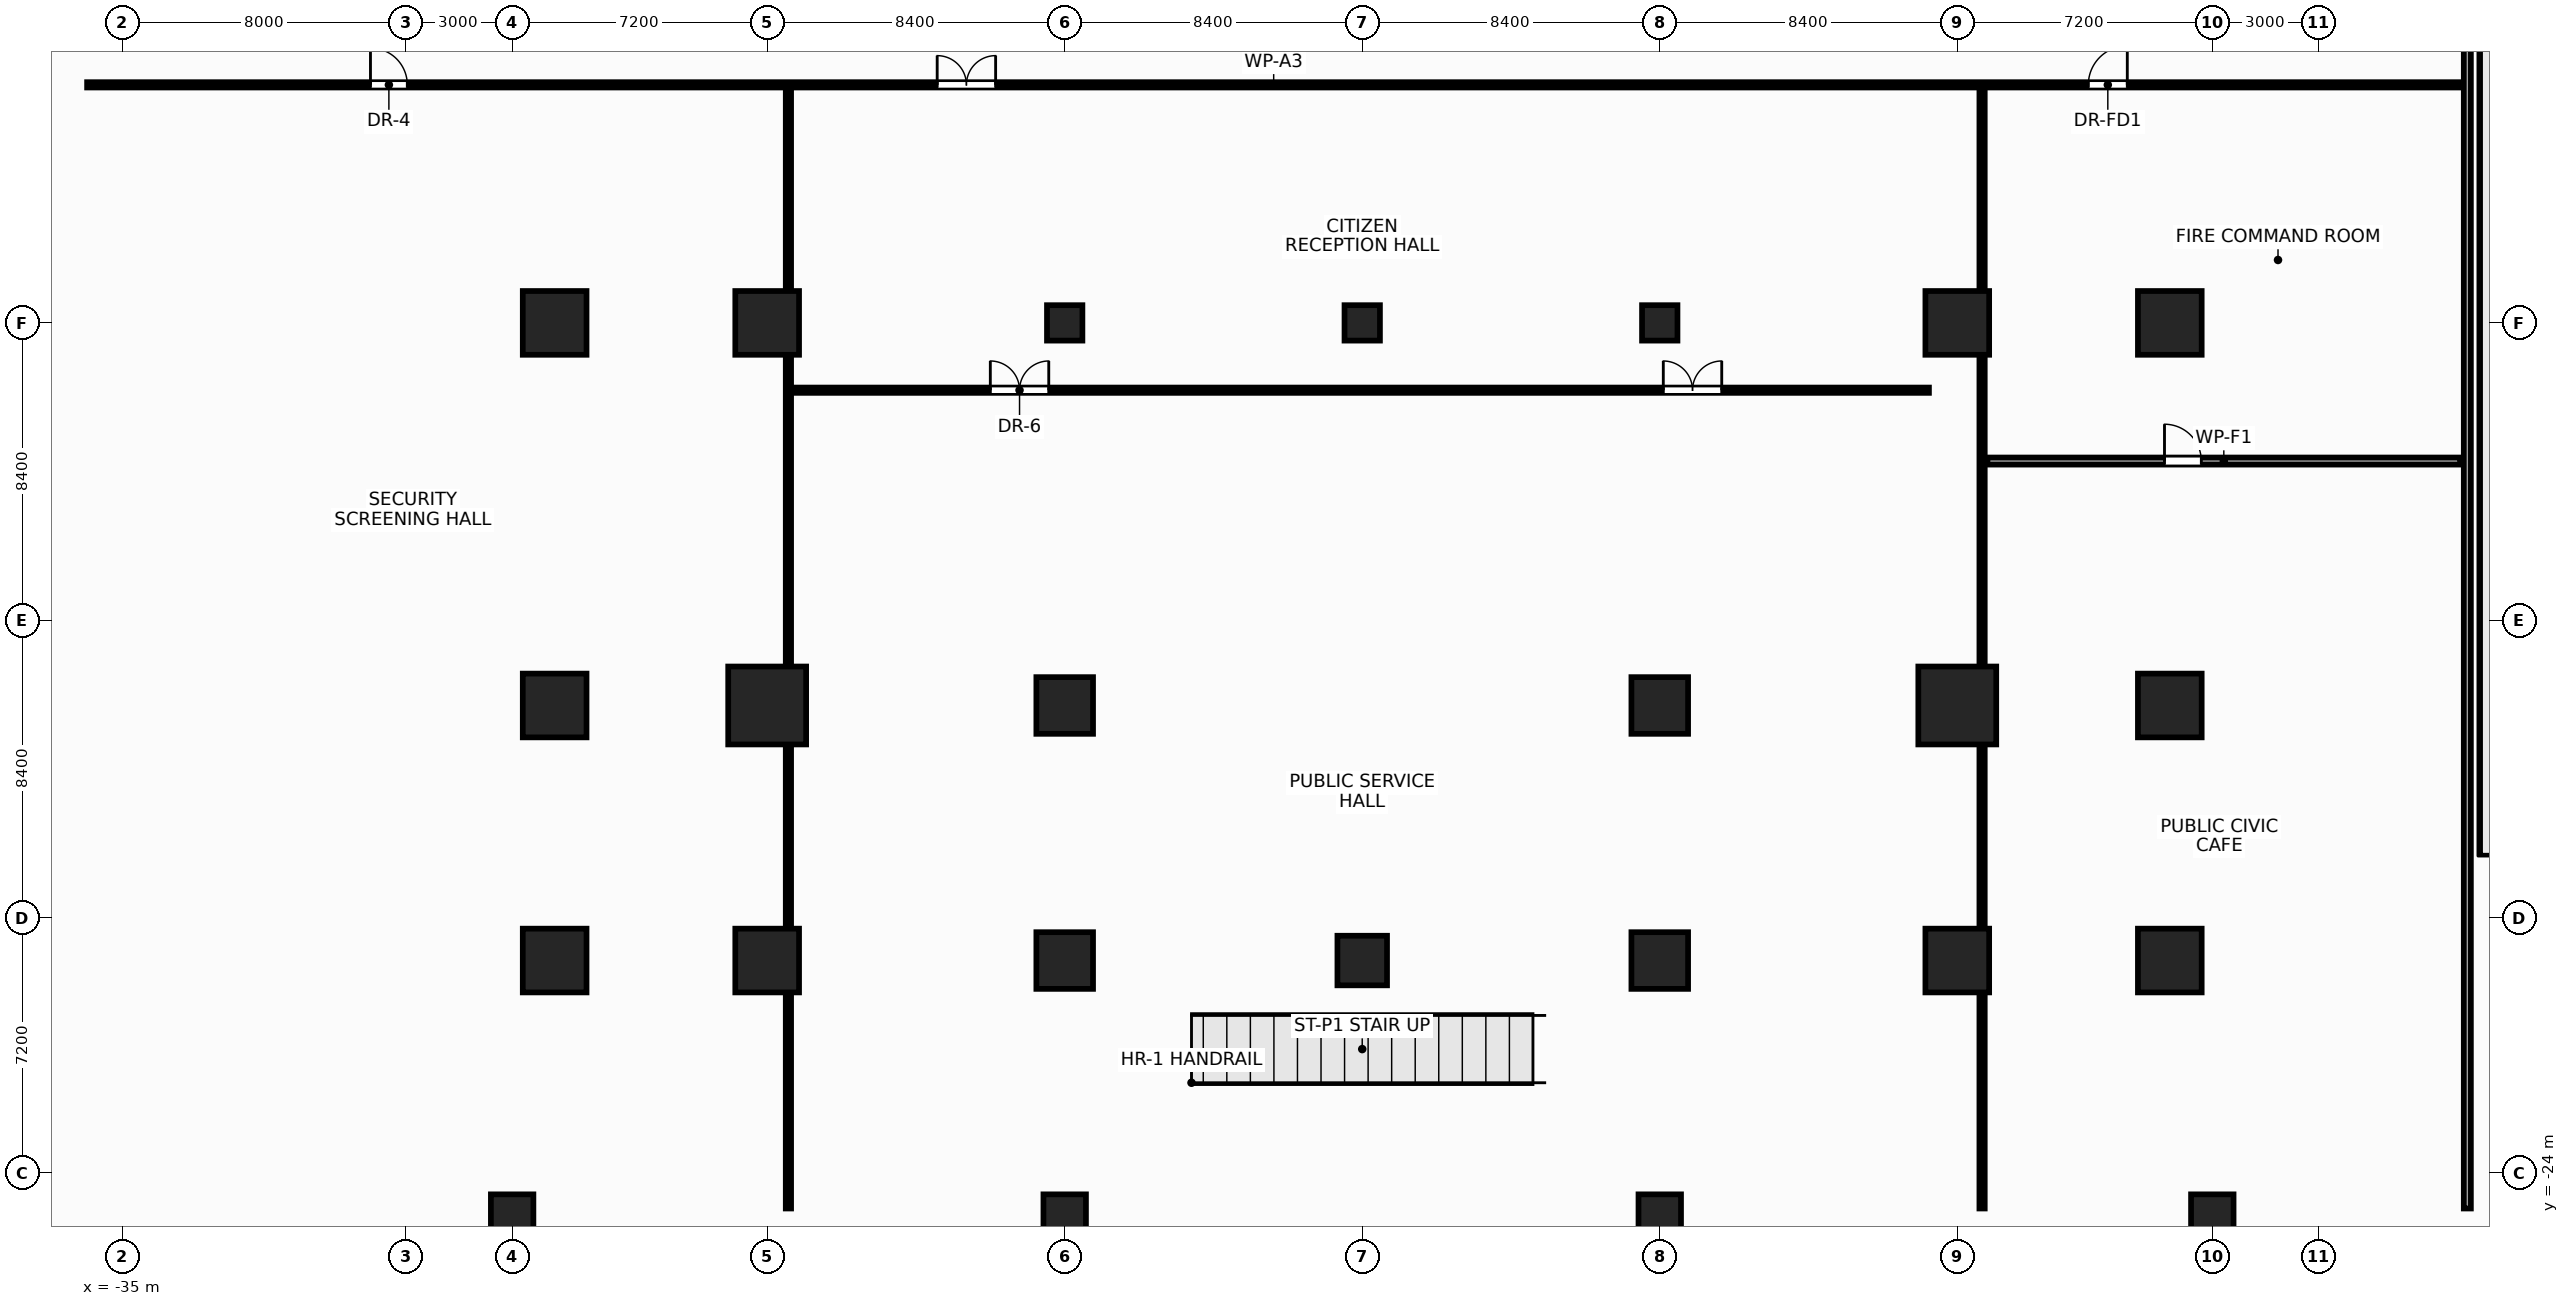
"""IFC4 building model, lengths in metres.
Left out: names, types, materials, properties, quantities, classifications, styles, units other than length and angle.
Written with IfcOpenShell. Run it as: python <this file> out.ifc"""

import sys

from ifc_helpers import new_model, si_unit, direction, frame, frame_2d, origin, origin_with_axes, origin_2d, place, context, subcontext, project, spatial, rectangle, hollow_rectangle, extrude, source, transform, mapped, element, fill, save


model = new_model("IFC4")
c1 = context("Model", 3, precision=1e-05, world=origin(), true_north=direction((0.0, 1.0)))
c2 = subcontext(c1, "Body", "Model", "MODEL_VIEW")
j1 = project(units=[si_unit("LENGTHUNIT", "METRE"), si_unit("PLANEANGLEUNIT", "RADIAN")], contexts=[c1])
p1 = place(None, origin())
s1 = spatial("IfcSite", under=j1, at=p1, CompositionType="ELEMENT")
p2 = place(p1, origin())
s2 = spatial("IfcBuilding", under=s1, at=p2, CompositionType="ELEMENT")
p3 = place(p2, origin())
s3 = spatial("IfcBuildingStorey", under=s2, at=p3, CompositionType="ELEMENT", Elevation=0.0)
m1 = source(origin(), c2, "Body", "SweptSolid", [
    extrude(hollow_rectangle(XDim=1.2, YDim=1.2, WallThickness=0.055, at=origin_2d()), origin(), (0.0, 0.0, 1.0), 5.0),
])
for number, where, z_axis, x_axis in (
    (1, (-24.0, -25.2, 0.0), (0.0, 0.0, 1.0), (1.0, 0.0, 0.0)),
    (2, (-8.4, -25.2, 0.0), (0.0, 0.0, 1.0), (1.0, 0.0, 0.0)),
    (3, (8.4, -25.2, 0.0), (0.0, 0.0, 1.0), (1.0, 0.0, 0.0)),
    (4, (24.0, -25.2, 0.0), (0.0, 0.0, 1.0), (1.0, 0.0, 0.0)),
):
    element("IfcColumn", number, at=place(p3, frame(where, z_axis=z_axis, x_axis=x_axis)), inside=s3, PredefinedType="COLUMN", context=c2, shape_type="MappedRepresentation", body=[
        mapped(m1, transform((0.0, 0.0, 0.0), x_axis=(1.0, 0.0, 0.0), y_axis=(0.0, 1.0, 0.0), z_axis=(0.0, 0.0, 1.0), scale=1.0)),
    ])
m2 = source(origin(), c2, "Body", "SweptSolid", [
    extrude(rectangle(XDim=1.8, YDim=1.8, at=origin_2d()), origin(), (0.0, 0.0, 1.0), 5.0),
])
p4 = place(p3, frame((-16.8, -18.0, 0.0), z_axis=(0.0, 0.0, 1.0), x_axis=(1.0, 0.0, 0.0)))
e5 = element("IfcColumn", 5, at=p4, inside=s3, PredefinedType="COLUMN", context=c2, shape_type="MappedRepresentation", body=[
    mapped(m2, transform((0.0, 0.0, 0.0), x_axis=(1.0, 0.0, 0.0), y_axis=(0.0, 1.0, 0.0), z_axis=(0.0, 0.0, 1.0), scale=1.0)),
])
m3 = source(origin(), c2, "Body", "SweptSolid", [
    extrude(rectangle(XDim=2.2, YDim=2.2, at=origin_2d()), origin(), (0.0, 0.0, 1.0), 5.0),
])
p5 = place(p3, frame((-16.8, -10.8, 0.0), z_axis=(0.0, 0.0, 1.0), x_axis=(1.0, 0.0, 0.0)))
e6 = element("IfcColumn", 6, at=p5, inside=s3, PredefinedType="COLUMN", context=c2, shape_type="MappedRepresentation", body=[
    mapped(m3, transform((0.0, 0.0, 0.0), x_axis=(1.0, 0.0, 0.0), y_axis=(0.0, 1.0, 0.0), z_axis=(0.0, 0.0, 1.0), scale=1.0)),
])
for number, where, z_axis, x_axis in (
    (7, (-16.8, 0.0, 0.0), (0.0, 0.0, 1.0), (1.0, 0.0, 0.0)),
    (8, (16.8, -18.0, 0.0), (0.0, 0.0, 1.0), (1.0, 0.0, 0.0)),
):
    element("IfcColumn", number, at=place(p3, frame(where, z_axis=z_axis, x_axis=x_axis)), inside=s3, PredefinedType="COLUMN", context=c2, shape_type="MappedRepresentation", body=[
        mapped(m2, transform((0.0, 0.0, 0.0), x_axis=(1.0, 0.0, 0.0), y_axis=(0.0, 1.0, 0.0), z_axis=(0.0, 0.0, 1.0), scale=1.0)),
    ])
p6 = place(p3, frame((16.8, -10.8, 0.0), z_axis=(0.0, 0.0, 1.0), x_axis=(1.0, 0.0, 0.0)))
e9 = element("IfcColumn", 9, at=p6, inside=s3, PredefinedType="COLUMN", context=c2, shape_type="MappedRepresentation", body=[
    mapped(m3, transform((0.0, 0.0, 0.0), x_axis=(1.0, 0.0, 0.0), y_axis=(0.0, 1.0, 0.0), z_axis=(0.0, 0.0, 1.0), scale=1.0)),
])
for number, where, z_axis, x_axis in (
    (10, (16.8, 0.0, 0.0), (0.0, 0.0, 1.0), (1.0, 0.0, 0.0)),
    (11, (-22.8, -18.0, 0.0), (0.0, 0.0, 1.0), (1.0, 0.0, 0.0)),
    (12, (-22.8, -10.8, 0.0), (0.0, 0.0, 1.0), (1.0, 0.0, 0.0)),
    (13, (-22.8, 0.0, 0.0), (0.0, 0.0, 1.0), (1.0, 0.0, 0.0)),
    (14, (22.8, -18.0, 0.0), (0.0, 0.0, 1.0), (1.0, 0.0, 0.0)),
    (15, (22.8, -10.8, 0.0), (0.0, 0.0, 1.0), (1.0, 0.0, 0.0)),
    (16, (22.8, 0.0, 0.0), (0.0, 0.0, 1.0), (1.0, 0.0, 0.0)),
):
    element("IfcColumn", number, at=place(p3, frame(where, z_axis=z_axis, x_axis=x_axis)), inside=s3, PredefinedType="COLUMN", context=c2, shape_type="MappedRepresentation", body=[
        mapped(m2, transform((0.0, 0.0, 0.0), x_axis=(1.0, 0.0, 0.0), y_axis=(0.0, 1.0, 0.0), z_axis=(0.0, 0.0, 1.0), scale=1.0)),
    ])
m4 = source(origin(), c2, "Body", "SweptSolid", [
    extrude(rectangle(XDim=1.6, YDim=1.6, at=origin_2d()), origin(), (0.0, 0.0, 1.0), 5.0),
])
p7 = place(p3, frame((-8.4, -18.0, 0.0), z_axis=(0.0, 0.0, 1.0), x_axis=(1.0, 0.0, 0.0)))
e17 = element("IfcColumn", 17, at=p7, inside=s3, PredefinedType="COLUMN", context=c2, shape_type="MappedRepresentation", body=[
    mapped(m4, transform((0.0, 0.0, 0.0), x_axis=(1.0, 0.0, 0.0), y_axis=(0.0, 1.0, 0.0), z_axis=(0.0, 0.0, 1.0), scale=1.0)),
])
m5 = source(origin(), c2, "Body", "SweptSolid", [
    extrude(hollow_rectangle(XDim=1.0, YDim=1.0, WallThickness=0.045, at=origin_2d()), origin(), (0.0, 0.0, 1.0), 5.0),
])
p8 = place(p3, frame((-8.4, 0.0, 0.0), z_axis=(0.0, 0.0, 1.0), x_axis=(1.0, 0.0, 0.0)))
e18 = element("IfcColumn", 18, at=p8, inside=s3, PredefinedType="COLUMN", context=c2, shape_type="MappedRepresentation", body=[
    mapped(m5, transform((0.0, 0.0, 0.0), x_axis=(1.0, 0.0, 0.0), y_axis=(0.0, 1.0, 0.0), z_axis=(0.0, 0.0, 1.0), scale=1.0)),
])
for number, where, z_axis, x_axis in (
    (19, (-8.4, -10.8, 0.0), (0.0, 0.0, 1.0), (1.0, 0.0, 0.0)),
    (20, (8.4, -18.0, 0.0), (0.0, 0.0, 1.0), (1.0, 0.0, 0.0)),
):
    element("IfcColumn", number, at=place(p3, frame(where, z_axis=z_axis, x_axis=x_axis)), inside=s3, PredefinedType="COLUMN", context=c2, shape_type="MappedRepresentation", body=[
        mapped(m4, transform((0.0, 0.0, 0.0), x_axis=(1.0, 0.0, 0.0), y_axis=(0.0, 1.0, 0.0), z_axis=(0.0, 0.0, 1.0), scale=1.0)),
    ])
p9 = place(p3, frame((8.4, 0.0, 0.0), z_axis=(0.0, 0.0, 1.0), x_axis=(1.0, 0.0, 0.0)))
e21 = element("IfcColumn", 21, at=p9, inside=s3, PredefinedType="COLUMN", context=c2, shape_type="MappedRepresentation", body=[
    mapped(m5, transform((0.0, 0.0, 0.0), x_axis=(1.0, 0.0, 0.0), y_axis=(0.0, 1.0, 0.0), z_axis=(0.0, 0.0, 1.0), scale=1.0)),
])
p10 = place(p3, frame((8.4, -10.8, 0.0), z_axis=(0.0, 0.0, 1.0), x_axis=(1.0, 0.0, 0.0)))
e22 = element("IfcColumn", 22, at=p10, inside=s3, PredefinedType="COLUMN", context=c2, shape_type="MappedRepresentation", body=[
    mapped(m4, transform((0.0, 0.0, 0.0), x_axis=(1.0, 0.0, 0.0), y_axis=(0.0, 1.0, 0.0), z_axis=(0.0, 0.0, 1.0), scale=1.0)),
])
m6 = source(origin(), c2, "Body", "SweptSolid", [
    extrude(rectangle(XDim=1.4, YDim=1.4, at=origin_2d()), origin(), (0.0, 0.0, 1.0), 5.0),
])
p11 = place(p3, frame((0.0, -18.0, 0.0), z_axis=(0.0, 0.0, 1.0), x_axis=(1.0, 0.0, 0.0)))
e23 = element("IfcColumn", 23, at=p11, inside=s3, PredefinedType="COLUMN", context=c2, shape_type="MappedRepresentation", body=[
    mapped(m6, transform((0.0, 0.0, 0.0), x_axis=(1.0, 0.0, 0.0), y_axis=(0.0, 1.0, 0.0), z_axis=(0.0, 0.0, 1.0), scale=1.0)),
])
m7 = source(origin(), c2, "Body", "SweptSolid", [
    extrude(rectangle(XDim=1.0, YDim=1.0, at=origin_2d()), origin(), (0.0, 0.0, 1.0), 5.0),
])
p12 = place(p3, origin_with_axes())
e24 = element("IfcColumn", 24, at=p12, inside=s3, PredefinedType="COLUMN", context=c2, shape_type="MappedRepresentation", body=[
    mapped(m7, transform((0.0, 0.0, 0.0), x_axis=(1.0, 0.0, 0.0), y_axis=(0.0, 1.0, 0.0), z_axis=(0.0, 0.0, 1.0), scale=1.0)),
])
m8 = source(origin(), c2, "Body", "SweptSolid", [
    extrude(rectangle(XDim=67.0, YDim=0.15, at=frame_2d((33.5, 0.0))), origin(), (0.0, 0.0, 1.0), 4.105),
])
p13 = place(p3, frame((-36.0, 6.72, 0.0), z_axis=(0.0, 0.0, 1.0), x_axis=(1.0, 0.0, 0.0)))
e25 = element("IfcWall", 25, at=p13, inside=s3, PredefinedType="PARTITIONING", context=c2, shape_type="MappedRepresentation", body=[
    mapped(m8, transform((0.0, 0.0, 0.0), x_axis=(1.0, 0.0, 0.0), y_axis=(0.0, 1.0, 0.0), z_axis=(0.0, 0.0, 1.0), scale=1.0)),
])
p14 = place(p13, frame((24.0, 0.0, 0.0)))
e26 = element("IfcOpeningElement", 26, at=p14, cuts=e25, PredefinedType="OPENING", context=c2, shape_type="SweptSolid", body=[
    extrude(rectangle(XDim=1.65, YDim=2.35, at=frame_2d((0.825, 1.175))), frame((0.0, 0.087, 0.0), z_axis=(0.0, -1.0, 0.0), x_axis=(1.0, 0.0, 0.0)), (0.0, 0.0, 1.0), 0.174),
])
p15 = place(p13, frame((8.0, 0.0, 0.0)))
e27 = element("IfcOpeningElement", 27, at=p15, cuts=e25, PredefinedType="OPENING", context=c2, shape_type="SweptSolid", body=[
    extrude(rectangle(XDim=1.04, YDim=2.2, at=frame_2d((0.52, 1.1))), frame((0.0, 0.087, 0.0), z_axis=(0.0, -1.0, 0.0), x_axis=(1.0, 0.0, 0.0)), (0.0, 0.0, 1.0), 0.174),
])
p16 = place(p13, frame((56.5, 0.0, 0.0)))
e28 = element("IfcOpeningElement", 28, at=p16, cuts=e25, PredefinedType="OPENING", context=c2, shape_type="SweptSolid", body=[
    extrude(rectangle(XDim=1.1, YDim=2.15, at=frame_2d((0.55, 1.075))), frame((0.0, 0.087, 0.0), z_axis=(0.0, -1.0, 0.0), x_axis=(1.0, 0.0, 0.0)), (0.0, 0.0, 1.0), 0.174),
])
m9 = source(origin(), c2, "Body", "SweptSolid", [
    extrude(rectangle(XDim=32.0, YDim=0.15, at=frame_2d((16.0, 0.0))), origin(), (0.0, 0.0, 1.0), 4.105),
])
p17 = place(p3, frame((-16.0, -1.9, 0.0), z_axis=(0.0, 0.0, 1.0), x_axis=(1.0, 0.0, 0.0)))
e29 = element("IfcWall", 29, at=p17, inside=s3, PredefinedType="PARTITIONING", context=c2, shape_type="MappedRepresentation", body=[
    mapped(m9, transform((0.0, 0.0, 0.0), x_axis=(1.0, 0.0, 0.0), y_axis=(0.0, 1.0, 0.0), z_axis=(0.0, 0.0, 1.0), scale=1.0)),
])
p18 = place(p17, frame((5.5, 0.0, 0.0)))
e30 = element("IfcOpeningElement", 30, at=p18, cuts=e29, PredefinedType="OPENING", context=c2, shape_type="SweptSolid", body=[
    extrude(rectangle(XDim=1.65, YDim=2.35, at=frame_2d((0.825, 1.175))), frame((0.0, 0.087, 0.0), z_axis=(0.0, -1.0, 0.0), x_axis=(1.0, 0.0, 0.0)), (0.0, 0.0, 1.0), 0.174),
])
p19 = place(p17, frame((24.5, 0.0, 0.0)))
e31 = element("IfcOpeningElement", 31, at=p19, cuts=e29, PredefinedType="OPENING", context=c2, shape_type="SweptSolid", body=[
    extrude(rectangle(XDim=1.65, YDim=2.35, at=frame_2d((0.825, 1.175))), frame((0.0, 0.087, 0.0), z_axis=(0.0, -1.0, 0.0), x_axis=(1.0, 0.0, 0.0)), (0.0, 0.0, 1.0), 0.174),
])
m10 = source(origin(), c2, "Body", "SweptSolid", [
    extrude(rectangle(XDim=31.55, YDim=0.15, at=frame_2d((15.775, 0.0))), origin(), (0.0, 0.0, 1.0), 4.105),
])
for number, where, z_axis, x_axis in (
    (32, (-16.2, -25.0, 0.0), (0.0, 0.0, 1.0), (0.0, 1.0, 0.0)),
    (33, (17.5, -25.0, 0.0), (0.0, 0.0, 1.0), (0.0, 1.0, 0.0)),
):
    element("IfcWall", number, at=place(p3, frame(where, z_axis=z_axis, x_axis=x_axis)), inside=s3, PredefinedType="PARTITIONING", context=c2, shape_type="MappedRepresentation", body=[
        mapped(m10, transform((0.0, 0.0, 0.0), x_axis=(1.0, 0.0, 0.0), y_axis=(0.0, 1.0, 0.0), z_axis=(0.0, 0.0, 1.0), scale=1.0)),
    ])
m11 = source(origin(), c2, "Body", "SweptSolid", [
    extrude(rectangle(XDim=13.35, YDim=0.2, at=frame_2d((6.675, 0.0))), origin(), (0.0, 0.0, 1.0), 4.105),
])
p20 = place(p3, frame((17.65, -3.9, 0.0), z_axis=(0.0, 0.0, 1.0), x_axis=(1.0, 0.0, 0.0)))
e34 = element("IfcWall", 34, at=p20, inside=s3, PredefinedType="PARTITIONING", context=c2, shape_type="MappedRepresentation", body=[
    mapped(m11, transform((0.0, 0.0, 0.0), x_axis=(1.0, 0.0, 0.0), y_axis=(0.0, 1.0, 0.0), z_axis=(0.0, 0.0, 1.0), scale=1.0)),
])
p21 = place(p20, frame((5.0, 0.0, 0.0)))
e35 = element("IfcOpeningElement", 35, at=p21, cuts=e34, PredefinedType="OPENING", context=c2, shape_type="SweptSolid", body=[
    extrude(rectangle(XDim=1.04, YDim=2.2, at=frame_2d((0.52, 1.1))), frame((0.0, 0.112, 0.0), z_axis=(0.0, -1.0, 0.0), x_axis=(1.0, 0.0, 0.0)), (0.0, 0.0, 1.0), 0.224),
])
m12 = source(origin(), c2, "Body", "SweptSolid", [
    extrude(rectangle(XDim=51.5, YDim=0.2, at=frame_2d((25.75, 0.0))), origin(), (0.0, 0.0, 1.0), 4.72),
])
p22 = place(p3, frame((31.2, -25.0, 0.0), z_axis=(0.0, 0.0, 1.0), x_axis=(0.0, 1.0, 0.0)))
e36 = element("IfcWall", 36, at=p22, inside=s3, PredefinedType="PARTITIONING", context=c2, shape_type="MappedRepresentation", body=[
    mapped(m12, transform((0.0, 0.0, 0.0), x_axis=(1.0, 0.0, 0.0), y_axis=(0.0, 1.0, 0.0), z_axis=(0.0, 0.0, 1.0), scale=1.0)),
])
m13 = source(origin(), c2, "Body", "SweptSolid", [
    extrude(rectangle(XDim=1.65, YDim=2.35, at=frame_2d((0.825, 1.175))), frame((0.0, 0.025, 0.0), z_axis=(0.0, -1.0, 0.0), x_axis=(1.0, 0.0, 0.0)), (0.0, 0.0, 1.0), 0.05),
])
p23 = place(p18, origin())
e37 = element("IfcDoor", 37, at=p23, inside=s3, OperationType="DOUBLE_DOOR_SINGLE_SWING", PredefinedType="DOOR", context=c2, shape_type="MappedRepresentation", body=[
    mapped(m13, transform((0.0, 0.0, 0.0), x_axis=(1.0, 0.0, 0.0), y_axis=(0.0, 1.0, 0.0), z_axis=(0.0, 0.0, 1.0), scale=1.0)),
])
fill(e30, e37)
p24 = place(p19, origin())
e38 = element("IfcDoor", 38, at=p24, inside=s3, OperationType="DOUBLE_DOOR_SINGLE_SWING", PredefinedType="DOOR", context=c2, shape_type="MappedRepresentation", body=[
    mapped(m13, transform((0.0, 0.0, 0.0), x_axis=(1.0, 0.0, 0.0), y_axis=(0.0, 1.0, 0.0), z_axis=(0.0, 0.0, 1.0), scale=1.0)),
])
fill(e31, e38)
p25 = place(p14, origin())
e39 = element("IfcDoor", 39, at=p25, inside=s3, OperationType="DOUBLE_DOOR_SINGLE_SWING", PredefinedType="DOOR", context=c2, shape_type="MappedRepresentation", body=[
    mapped(m13, transform((0.0, 0.0, 0.0), x_axis=(1.0, 0.0, 0.0), y_axis=(0.0, 1.0, 0.0), z_axis=(0.0, 0.0, 1.0), scale=1.0)),
])
fill(e26, e39)
m14 = source(origin(), c2, "Body", "SweptSolid", [
    extrude(rectangle(XDim=1.04, YDim=2.2, at=frame_2d((0.52, 1.1))), frame((0.0, 0.025, 0.0), z_axis=(0.0, -1.0, 0.0), x_axis=(1.0, 0.0, 0.0)), (0.0, 0.0, 1.0), 0.05),
])
p26 = place(p15, origin())
e40 = element("IfcDoor", 40, at=p26, inside=s3, OperationType="SINGLE_SWING_LEFT", PredefinedType="DOOR", context=c2, shape_type="MappedRepresentation", body=[
    mapped(m14, transform((0.0, 0.0, 0.0), x_axis=(1.0, 0.0, 0.0), y_axis=(0.0, 1.0, 0.0), z_axis=(0.0, 0.0, 1.0), scale=1.0)),
])
fill(e27, e40)
m15 = source(origin(), c2, "Body", "SweptSolid", [
    extrude(rectangle(XDim=1.1, YDim=2.15, at=frame_2d((0.55, 1.075))), frame((0.0, 0.025, 0.0), z_axis=(0.0, -1.0, 0.0), x_axis=(1.0, 0.0, 0.0)), (0.0, 0.0, 1.0), 0.05),
])
p27 = place(p16, origin())
e41 = element("IfcDoor", 41, at=p27, inside=s3, OperationType="SINGLE_SWING_RIGHT", PredefinedType="DOOR", context=c2, shape_type="MappedRepresentation", body=[
    mapped(m15, transform((0.0, 0.0, 0.0), x_axis=(1.0, 0.0, 0.0), y_axis=(0.0, 1.0, 0.0), z_axis=(0.0, 0.0, 1.0), scale=1.0)),
])
fill(e28, e41)
p28 = place(p21, origin())
e42 = element("IfcDoor", 42, at=p28, inside=s3, OperationType="SINGLE_SWING_LEFT", PredefinedType="DOOR", context=c2, shape_type="MappedRepresentation", body=[
    mapped(m14, transform((0.0, 0.0, 0.0), x_axis=(1.0, 0.0, 0.0), y_axis=(0.0, 1.0, 0.0), z_axis=(0.0, 0.0, 1.0), scale=1.0)),
])
fill(e35, e42)
save(model, sys.argv[1])
